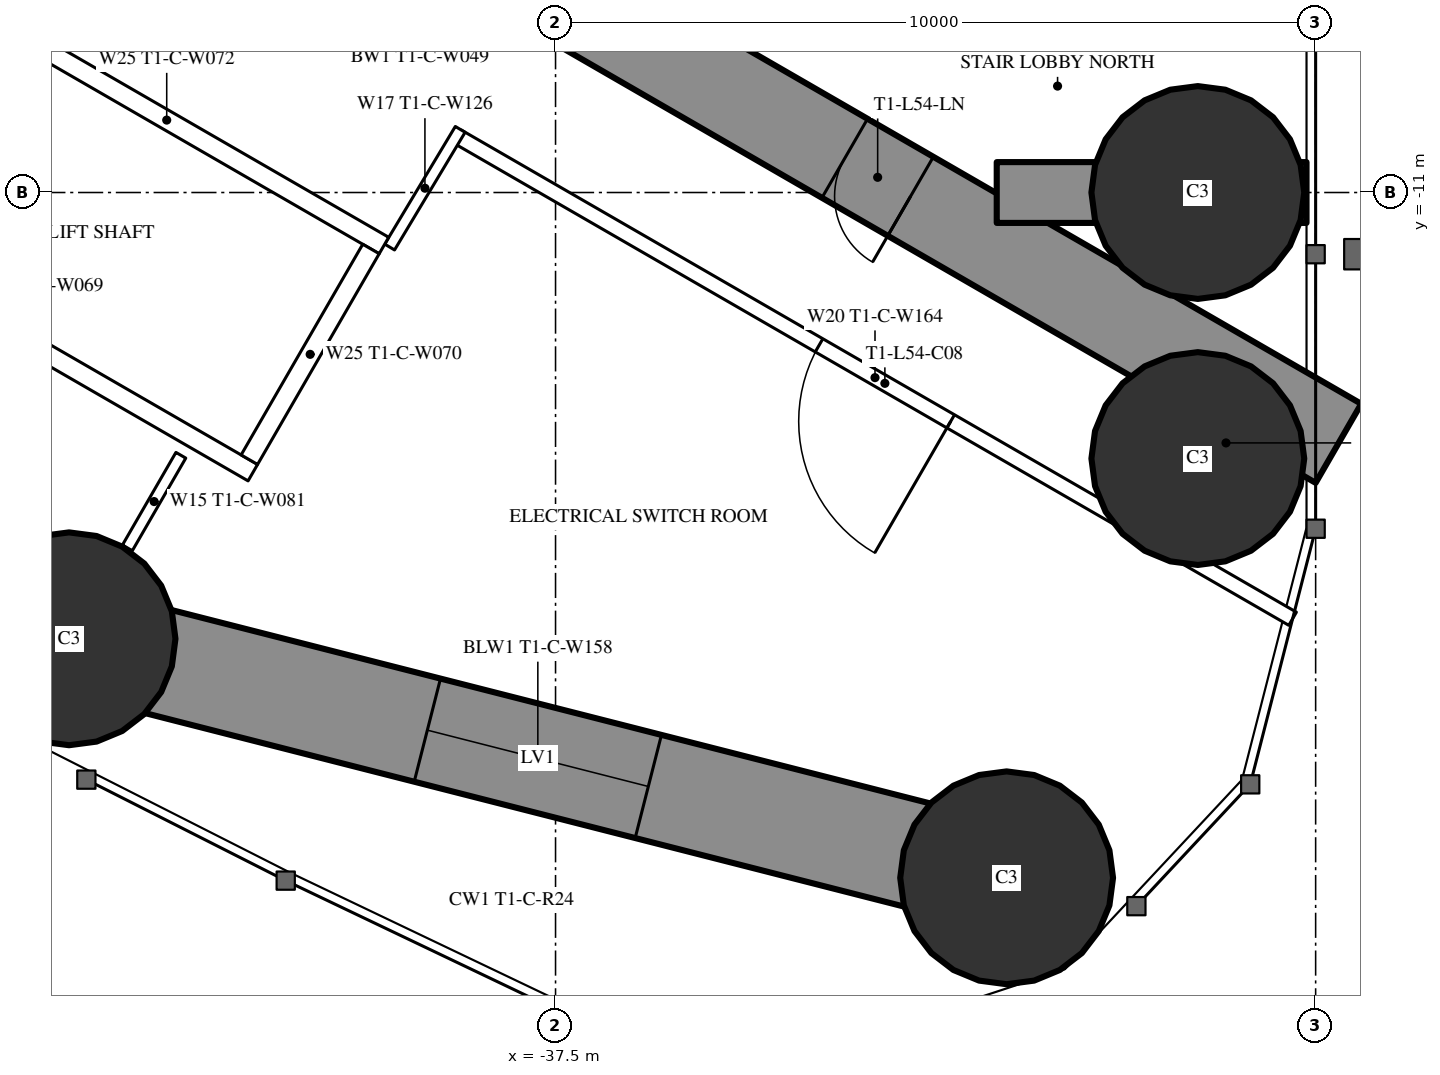
"""IFC4 building model, lengths in metres.
Left out: names, types, materials, properties, quantities, classifications, styles, units other than length and angle.
Written with IfcOpenShell. Run it as: python <this file> out.ifc"""

import sys

from ifc_helpers import new_model, si_unit, direction, frame, frame_2d, origin, origin_2d, place, context, subcontext, project, spatial, rectangle, circle, extrude, element, fill, save


model = new_model("IFC4")
c1 = context("Model", 3, precision=1e-05, world=origin(), true_north=direction((0.0, 1.0)))
c2 = subcontext(c1, "Body", "Model", "MODEL_VIEW")
j1 = project(units=[si_unit("LENGTHUNIT", "METRE"), si_unit("PLANEANGLEUNIT", "RADIAN")], contexts=[c1])
p1 = place(None, origin())
s1 = spatial("IfcSite", under=j1, at=p1, CompositionType="ELEMENT")
p2 = place(p1, origin())
s2 = spatial("IfcBuilding", under=s1, at=p2, CompositionType="ELEMENT")
p3 = place(p2, frame((0.0, 0.0, 201.8)))
s3 = spatial("IfcBuildingStorey", under=s2, at=p3, CompositionType="ELEMENT", Elevation=201.8)
for number, where, z_axis, x_axis in (
    (1, (-31.565, -20.016, 0.0), (0.0, 0.0, 1.0), (1.0, 0.0, 0.0)),
    (2, (-29.05, -11.0, 0.0), (0.0, 0.0, 1.0), (1.0, 0.0, 0.0)),
    (3, (-29.05, -14.5, 0.0), (0.0, 0.0, 1.0), (1.0, 0.0, 0.0)),
    (4, (-43.9, -16.871, 0.0), (0.0, 0.0, 1.0), (1.0, 0.0, 0.0)),
):
    element("IfcColumn", number, at=place(p3, frame(where, z_axis=z_axis, x_axis=x_axis)), inside=s3, PredefinedType="COLUMN", context=c2, shape_type="SweptSolid", body=[
        extrude(circle(Radius=1.4, at=origin_2d()), origin(), (0.0, 0.0, 1.0), 3.5),
    ])
p4 = place(p3, frame((-27.2, -14.3, 0.0), z_axis=(0.0, 0.0, 1.0), x_axis=(-0.866024021859, 0.500002393557, 0.0)))
e5 = element("IfcWall", 5, at=p4, inside=s3, PredefinedType="SHEAR", context=c2, shape_type="SweptSolid", body=[
    extrude(rectangle(XDim=27.907, YDim=1.2, at=frame_2d((13.954, 0.0))), origin(), (0.0, 0.0, 1.0), 3.5),
])
p5 = place(p4, frame((6.5, 0.0, 0.0)))
e6 = element("IfcOpeningElement", 6, at=p5, cuts=e5, PredefinedType="OPENING", context=c2, shape_type="SweptSolid", body=[
    extrude(rectangle(XDim=1.0, YDim=2.2, at=frame_2d((0.5, 1.1))), frame((0.0, 0.61, 0.0), z_axis=(0.0, -1.0, 0.0), x_axis=(1.0, 0.0, 0.0)), (0.0, 0.0, 1.0), 1.22),
])
p6 = place(p4, frame((13.829, 0.0, 0.0)))
e7 = element("IfcOpeningElement", 7, at=p6, cuts=e5, PredefinedType="OPENING", context=c2, shape_type="SweptSolid", body=[
    extrude(rectangle(XDim=1.8, YDim=2.2, at=frame_2d((0.9, 1.1))), frame((0.0, 0.61, 0.0), z_axis=(0.0, -1.0, 0.0), x_axis=(1.0, 0.0, 0.0)), (0.0, 0.0, 1.0), 1.22),
])
p7 = place(p3, frame((-27.62, -11.0, 0.0), z_axis=(0.0, 0.0, 1.0), x_axis=(-1.0, 0.0, 0.0)))
e8 = element("IfcWall", 8, at=p7, inside=s3, PredefinedType="SHEAR", context=c2, shape_type="SweptSolid", body=[
    extrude(rectangle(XDim=4.076, YDim=0.8, at=frame_2d((2.038, 0.0))), origin(), (0.0, 0.0, 1.0), 3.5),
])
p8 = place(p3, frame((-50.839, -13.043, 0.0), z_axis=(0.0, 0.0, 1.0), x_axis=(0.875577684027, -0.483077342911, 0.0)))
e9 = element("IfcWall", 9, at=p8, inside=s3, PredefinedType="SHEAR", context=c2, shape_type="SweptSolid", body=[
    extrude(rectangle(XDim=7.925, YDim=1.4, at=frame_2d((3.962, 0.0))), origin(), (0.0, 0.0, 1.0), 3.5),
])
p9 = place(p8, frame((2.462, 0.0, 0.6)))
e10 = element("IfcOpeningElement", 10, at=p9, cuts=e9, PredefinedType="OPENING", context=c2, shape_type="SweptSolid", body=[
    extrude(rectangle(XDim=3.0, YDim=1.2, at=frame_2d((1.5, 0.6))), frame((0.0, 0.71, 0.0), z_axis=(0.0, -1.0, 0.0), x_axis=(1.0, 0.0, 0.0)), (0.0, 0.0, 1.0), 1.42),
])
p10 = place(p3, frame((-43.9, -16.871, 0.0), z_axis=(0.0, 0.0, 1.0), x_axis=(0.969008414312, -0.247027717052, 0.0)))
e11 = element("IfcWall", 11, at=p10, inside=s3, PredefinedType="SHEAR", context=c2, shape_type="SweptSolid", body=[
    extrude(rectangle(XDim=12.729, YDim=1.4, at=frame_2d((6.365, 0.0))), origin(), (0.0, 0.0, 1.0), 3.5),
])
p11 = place(p10, frame((4.865, 0.0, 0.6)))
e12 = element("IfcOpeningElement", 12, at=p11, cuts=e11, PredefinedType="OPENING", context=c2, shape_type="SweptSolid", body=[
    extrude(rectangle(XDim=3.0, YDim=1.2, at=frame_2d((1.5, 0.6))), frame((0.0, 0.71, 0.0), z_axis=(0.0, -1.0, 0.0), x_axis=(1.0, 0.0, 0.0)), (0.0, 0.0, 1.0), 1.42),
])
p12 = place(p3, frame((-42.429, -14.457, 0.0), z_axis=(0.0, 0.0, 1.0), x_axis=(-0.5000578829, -0.865991982497, 0.0)))
e13 = element("IfcWall", 13, at=p12, inside=s3, PredefinedType="PARTITIONING", context=c2, shape_type="SweptSolid", body=[
    extrude(rectangle(XDim=1.407, YDim=0.15, at=frame_2d((0.704, 0.0))), origin(), (0.0, 0.0, 1.0), 3.25),
])
p13 = place(p3, frame((-27.803, -16.608, 0.0), z_axis=(0.0, 0.0, 1.0), x_axis=(-0.866028577512, 0.499994502903, 0.0)))
e14 = element("IfcWall", 14, at=p13, inside=s3, PredefinedType="PARTITIONING", context=c2, shape_type="SweptSolid", body=[
    extrude(rectangle(XDim=12.688, YDim=0.2, at=frame_2d((6.344, 0.0))), origin(), (0.0, 0.0, 1.0), 3.25),
])
p14 = place(p13, frame((5.194, 0.0, 0.0)))
e15 = element("IfcOpeningElement", 15, at=p14, cuts=e14, PredefinedType="OPENING", context=c2, shape_type="SweptSolid", body=[
    extrude(rectangle(XDim=2.0, YDim=2.4, at=frame_2d((1.0, 1.2))), frame((0.0, 0.11, 0.0), z_axis=(0.0, -1.0, 0.0), x_axis=(1.0, 0.0, 0.0)), (0.0, 0.0, 1.0), 0.22),
])
p15 = place(p3, frame((-39.683, -11.718, 0.0), z_axis=(0.0, 0.0, 1.0), x_axis=(0.514336634837, 0.857588377991, 0.0)))
e16 = element("IfcWall", 16, at=p15, inside=s3, PredefinedType="PARTITIONING", context=c2, shape_type="SweptSolid", body=[
    extrude(rectangle(XDim=1.805, YDim=0.15, at=frame_2d((0.903, 0.0))), origin(), (0.0, 0.0, 1.0), 3.25),
])
p16 = place(p3, frame((-39.758, -11.697, 0.0), z_axis=(0.0, 0.0, 1.0), x_axis=(-0.866024194504, 0.500002094529, 0.0)))
e17 = element("IfcWall", 17, at=p16, inside=s3, PredefinedType="PARTITIONING", context=c2, shape_type="SweptSolid", body=[
    extrude(rectangle(XDim=6.6, YDim=0.25, at=frame_2d((3.3, 0.0))), origin(), (0.0, 0.0, 1.0), 3.25),
])
p17 = place(p3, frame((-41.482, -14.686, 0.0), z_axis=(0.0, 0.0, 1.0), x_axis=(-0.86603344179, 0.499986077507, 0.0)))
e18 = element("IfcWall", 18, at=p17, inside=s3, PredefinedType="PARTITIONING", context=c2, shape_type="SweptSolid", body=[
    extrude(rectangle(XDim=6.6, YDim=0.25, at=frame_2d((3.3, 0.0))), origin(), (0.0, 0.0, 1.0), 3.25),
])
p18 = place(p3, frame((-39.928, -11.743, 0.0), z_axis=(0.0, 0.0, 1.0), x_axis=(-0.499929347863, -0.866066190972, 0.0)))
e19 = element("IfcWall", 19, at=p18, inside=s3, PredefinedType="PARTITIONING", context=c2, shape_type="SweptSolid", body=[
    extrude(rectangle(XDim=3.201, YDim=0.25, at=frame_2d((1.6, 0.0))), origin(), (0.0, 0.0, 1.0), 3.25),
])
p19 = place(p11, origin())
e20 = element("IfcWindow", 20, at=p19, inside=s3, PartitioningType="SINGLE_PANEL", PredefinedType="WINDOW", context=c2, shape_type="SweptSolid", body=[
    extrude(rectangle(XDim=3.0, YDim=1.2, at=frame_2d((1.5, 0.6))), frame((0.0, 0.03, 0.0), z_axis=(0.0, -1.0, 0.0), x_axis=(1.0, 0.0, 0.0)), (0.0, 0.0, 1.0), 0.06),
])
fill(e12, e20)
p20 = place(p14, origin())
e21 = element("IfcDoor", 21, at=p20, inside=s3, OperationType="DOUBLE_DOOR_SINGLE_SWING", PredefinedType="DOOR", context=c2, shape_type="SweptSolid", body=[
    extrude(rectangle(XDim=2.0, YDim=2.4, at=frame_2d((1.0, 1.2))), frame((0.0, 0.025, 0.0), z_axis=(0.0, -1.0, 0.0), x_axis=(1.0, 0.0, 0.0)), (0.0, 0.0, 1.0), 0.05),
])
fill(e15, e21)
p21 = place(p5, origin())
e22 = element("IfcDoor", 22, at=p21, inside=s3, OperationType="SINGLE_SWING_LEFT", PredefinedType="DOOR", context=c2, shape_type="SweptSolid", body=[
    extrude(rectangle(XDim=1.0, YDim=2.2, at=frame_2d((0.5, 1.1))), frame((0.0, 0.025, 0.0), z_axis=(0.0, -1.0, 0.0), x_axis=(1.0, 0.0, 0.0)), (0.0, 0.0, 1.0), 0.05),
])
fill(e6, e22)
save(model, sys.argv[1])
